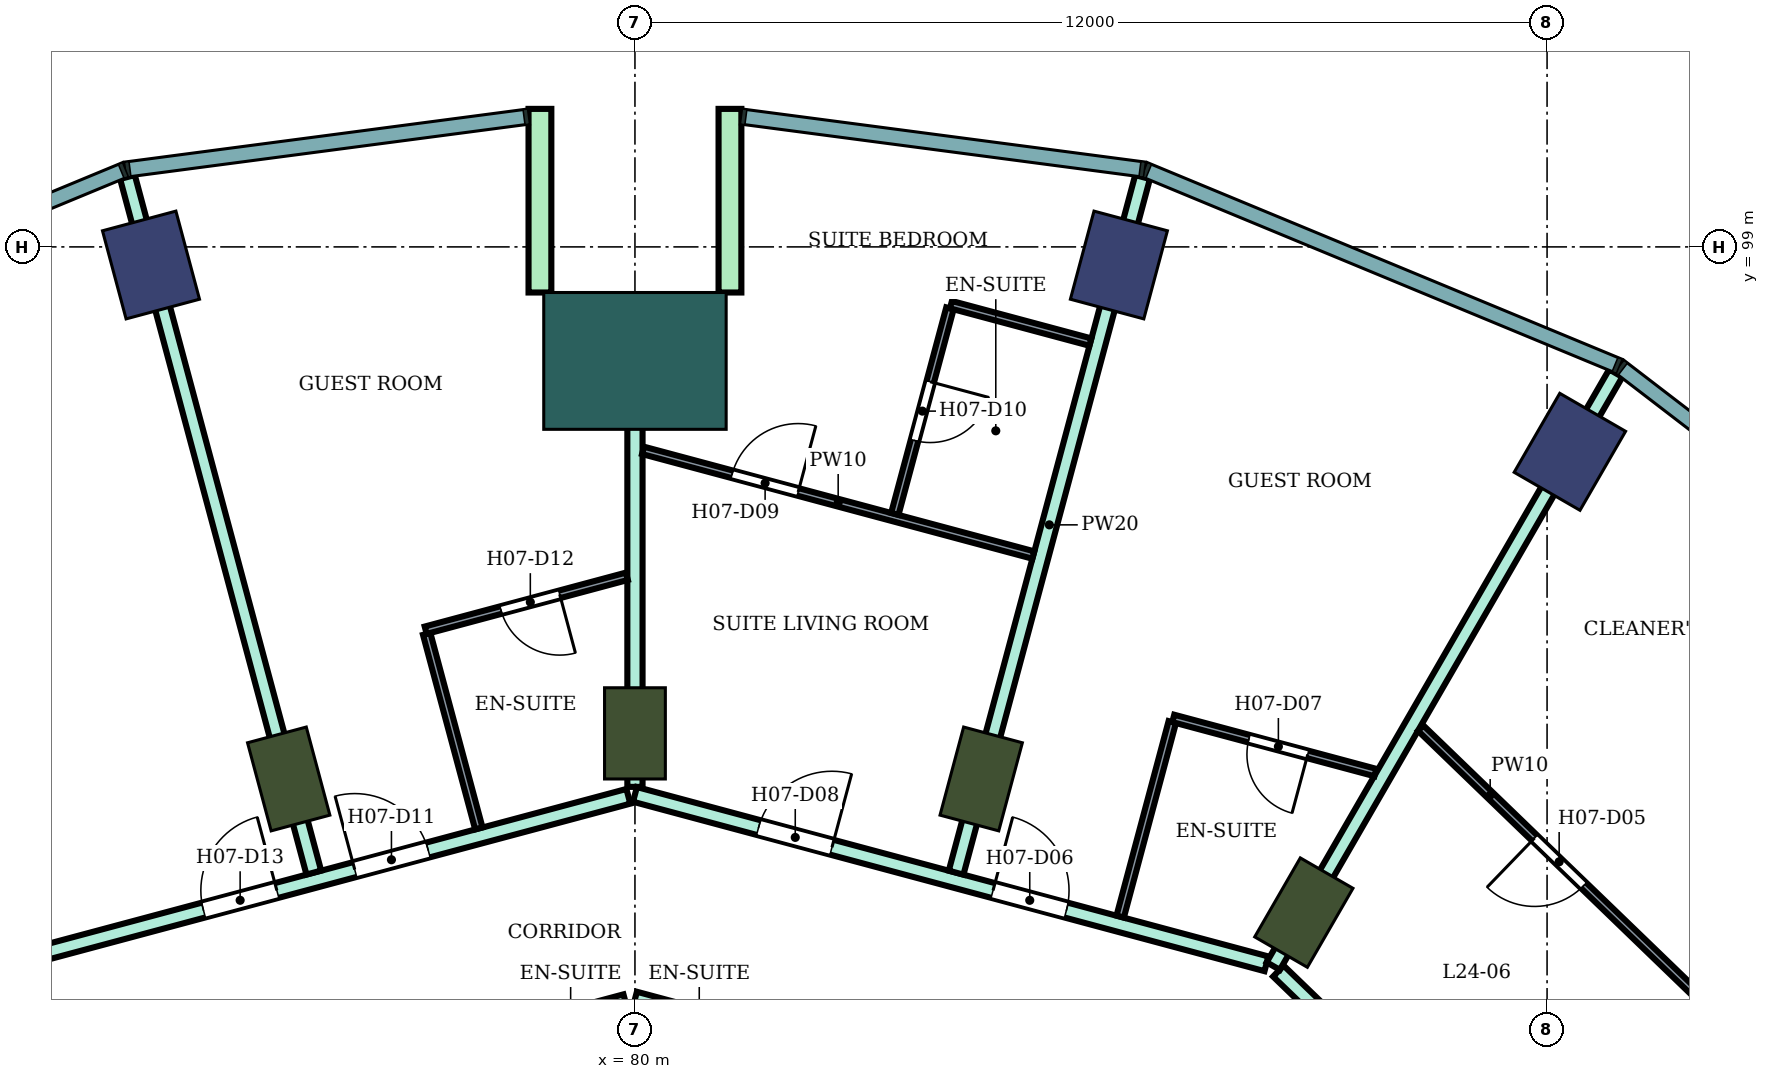
"""IFC4 building model, lengths in metres.
Left out: names, types, materials, properties, quantities, classifications, styles, units other than length and angle.
Written with IfcOpenShell. Run it as: python <this file> out.ifc"""

import sys

from ifc_helpers import new_model, si_unit, direction, frame, frame_2d, origin, origin_2d, place, context, subcontext, project, spatial, rectangle, extrude, element, fill, save


model = new_model("IFC4")
c1 = context("Model", 3, precision=1e-05, world=origin(), true_north=direction((0.0, 1.0)))
c2 = subcontext(c1, "Body", "Model", "MODEL_VIEW")
j1 = project(units=[si_unit("LENGTHUNIT", "METRE"), si_unit("PLANEANGLEUNIT", "RADIAN")], contexts=[c1])
p1 = place(None, origin())
s1 = spatial("IfcSite", under=j1, at=p1, CompositionType="ELEMENT")
p2 = place(p1, origin())
s2 = spatial("IfcBuilding", under=s1, at=p2, CompositionType="ELEMENT")
p3 = place(p2, frame((0.0, 0.0, 105.2)))
s3 = spatial("IfcBuildingStorey", under=s2, at=p3, CompositionType="ELEMENT", Elevation=105.2)
for number, where, z_axis, x_axis in (
    (1, (92.3, 96.304, 0.0), (0.0, 0.0, 1.0), (0.5, 0.866, 0.0)),
    (2, (86.367, 98.762, 0.0), (0.0, 0.0, 1.0), (0.259, 0.966, 0.0)),
    (3, (73.633, 98.762, 0.0), (0.0, 0.0, 1.0), (-0.259, 0.966, 0.0)),
):
    element("IfcColumn", number, at=place(p3, frame(where, z_axis=z_axis, x_axis=x_axis)), inside=s3, PredefinedType="COLUMN", context=c2, shape_type="SweptSolid", body=[
        extrude(rectangle(XDim=1.2, YDim=1.0, at=origin_2d()), origin(), (0.0, 0.0, 1.0), 3.8),
    ])
for number, where, z_axis, x_axis in (
    (4, (88.8, 90.242, 0.0), (0.0, 0.0, 1.0), (0.5, 0.866, 0.0)),
    (5, (84.555, 92.0, 0.0), (0.0, 0.0, 1.0), (0.259, 0.966, 0.0)),
    (6, (80.0, 92.6, 0.0), (0.0, 0.0, 1.0), (0.0, 1.0, 0.0)),
    (7, (75.445, 92.0, 0.0), (0.0, 0.0, 1.0), (-0.259, 0.966, 0.0)),
):
    element("IfcColumn", number, at=place(p3, frame(where, z_axis=z_axis, x_axis=x_axis)), inside=s3, PredefinedType="COLUMN", context=c2, shape_type="SweptSolid", body=[
        extrude(rectangle(XDim=1.2, YDim=0.8, at=origin_2d()), origin(), (0.0, 0.0, 1.0), 3.8),
    ])
p4 = place(p3, frame((80.0, 97.5, 0.0), z_axis=(0.0, 0.0, 1.0), x_axis=(0.0, 1.0, 0.0)))
e8 = element("IfcColumn", 8, at=p4, inside=s3, PredefinedType="COLUMN", context=c2, shape_type="SweptSolid", body=[
    extrude(rectangle(XDim=1.8, YDim=2.4, at=origin_2d()), origin(), (0.0, 0.0, 1.0), 3.8),
])
for number, where, z_axis, x_axis in (
    (9, (81.25, 98.4, 0.0), (0.0, 0.0, 1.0), (0.0, 1.0, 0.0)),
    (10, (78.75, 98.4, 0.0), (0.0, 0.0, 1.0), (0.0, 1.0, 0.0)),
):
    element("IfcWall", number, at=place(p3, frame(where, z_axis=z_axis, x_axis=x_axis)), inside=s3, PredefinedType="NOTDEFINED", context=c2, shape_type="SweptSolid", body=[
        extrude(rectangle(XDim=2.416, YDim=0.3, at=frame_2d((1.208, 0.0))), origin(), (0.0, 0.0, 1.0), 3.8),
    ])
p5 = place(p3, frame((71.614, 89.55, 0.0), z_axis=(0.0, 0.0, 1.0), x_axis=(0.96597505802, 0.258635239832, 0.0)))
e11 = element("IfcWall", 11, at=p5, inside=s3, PredefinedType="PARTITIONING", context=c2, shape_type="SweptSolid", body=[
    extrude(rectangle(XDim=8.592, YDim=0.2, at=frame_2d((4.296, 0.0))), origin(), (0.0, 0.0, 1.0), 3.35),
])
p6 = place(p5, frame((4.865, 0.0, 0.0)))
e12 = element("IfcOpeningElement", 12, at=p6, cuts=e11, PredefinedType="OPENING", context=c2, shape_type="SweptSolid", body=[
    extrude(rectangle(XDim=1.0, YDim=2.1, at=frame_2d((0.5, 1.05))), frame((0.0, 0.11, 0.0), z_axis=(0.0, -1.0, 0.0), x_axis=(1.0, 0.0, 0.0)), (0.0, 0.0, 1.0), 0.22),
])
p7 = place(p5, frame((2.804, 0.0, 0.0)))
e13 = element("IfcOpeningElement", 13, at=p7, cuts=e11, PredefinedType="OPENING", context=c2, shape_type="SweptSolid", body=[
    extrude(rectangle(XDim=1.0, YDim=2.1, at=frame_2d((0.5, 1.05))), frame((0.0, 0.11, 0.0), z_axis=(0.0, -1.0, 0.0), x_axis=(1.0, 0.0, 0.0)), (0.0, 0.0, 1.0), 0.22),
])
p8 = place(p3, frame((73.071, 87.247, 0.0), z_axis=(0.0, 0.0, 1.0), x_axis=(0.965931651205, 0.258797305243, 0.0)))
e14 = element("IfcWall", 14, at=p8, inside=s3, PredefinedType="PARTITIONING", context=c2, shape_type="SweptSolid", body=[
    extrude(rectangle(XDim=7.043, YDim=0.2, at=frame_2d((3.521, 0.0))), origin(), (0.0, 0.0, 1.0), 3.35),
])
p9 = place(p8, frame((0.41, 0.0, 0.0)))
e15 = element("IfcOpeningElement", 15, at=p9, cuts=e14, PredefinedType="OPENING", context=c2, shape_type="SweptSolid", body=[
    extrude(rectangle(XDim=1.0, YDim=2.1, at=frame_2d((0.5, 1.05))), frame((0.0, 0.11, 0.0), z_axis=(0.0, -1.0, 0.0), x_axis=(1.0, 0.0, 0.0)), (0.0, 0.0, 1.0), 0.22),
])
p10 = place(p3, frame((73.323, 99.919, 0.0), z_axis=(0.0, 0.0, 1.0), x_axis=(0.258818956582, -0.965925850008, 0.0)))
e16 = element("IfcWall", 16, at=p10, inside=s3, PredefinedType="PARTITIONING", context=c2, shape_type="SweptSolid", body=[
    extrude(rectangle(XDim=9.473, YDim=0.2, at=frame_2d((4.737, 0.0))), origin(), (0.0, 0.0, 1.0), 3.35),
])
p11 = place(p3, frame((80.0, 89.104, 0.0), z_axis=(0.0, 0.0, 1.0), x_axis=(0.965856548257, -0.259077455964, 0.0)))
e17 = element("IfcWall", 17, at=p11, inside=s3, PredefinedType="PARTITIONING", context=c2, shape_type="SweptSolid", body=[
    extrude(rectangle(XDim=7.173, YDim=0.2, at=frame_2d((3.586, 0.0))), origin(), (0.0, 0.0, 1.0), 3.35),
])
p12 = place(p11, frame((5.763, 0.0, 0.0)))
e18 = element("IfcOpeningElement", 18, at=p12, cuts=e17, PredefinedType="OPENING", context=c2, shape_type="SweptSolid", body=[
    extrude(rectangle(XDim=1.0, YDim=2.1, at=frame_2d((0.5, 1.05))), frame((0.0, 0.11, 0.0), z_axis=(0.0, -1.0, 0.0), x_axis=(1.0, 0.0, 0.0)), (0.0, 0.0, 1.0), 0.22),
])
p13 = place(p3, frame((80.0, 91.896, 0.0), z_axis=(0.0, 0.0, 1.0), x_axis=(0.0, 1.0, 0.0)))
e19 = element("IfcWall", 19, at=p13, inside=s3, PredefinedType="PARTITIONING", context=c2, shape_type="SweptSolid", body=[
    extrude(rectangle(XDim=6.304, YDim=0.2, at=frame_2d((3.152, 0.0))), origin(), (0.0, 0.0, 1.0), 3.35),
])
p14 = place(p3, frame((80.0, 91.797, 0.0), z_axis=(0.0, 0.0, 1.0), x_axis=(0.965857042792, -0.259075612301, 0.0)))
e20 = element("IfcWall", 20, at=p14, inside=s3, PredefinedType="PARTITIONING", context=c2, shape_type="SweptSolid", body=[
    extrude(rectangle(XDim=8.602, YDim=0.2, at=frame_2d((4.301, 0.0))), origin(), (0.0, 0.0, 1.0), 3.35),
])
p15 = place(p14, frame((4.877, 0.0, 0.0)))
e21 = element("IfcOpeningElement", 21, at=p15, cuts=e20, PredefinedType="OPENING", context=c2, shape_type="SweptSolid", body=[
    extrude(rectangle(XDim=1.0, YDim=2.1, at=frame_2d((0.5, 1.05))), frame((0.0, 0.11, 0.0), z_axis=(0.0, -1.0, 0.0), x_axis=(1.0, 0.0, 0.0)), (0.0, 0.0, 1.0), 0.22),
])
p16 = place(p14, frame((1.683, 0.0, 0.0)))
e22 = element("IfcOpeningElement", 22, at=p16, cuts=e20, PredefinedType="OPENING", context=c2, shape_type="SweptSolid", body=[
    extrude(rectangle(XDim=1.0, YDim=2.1, at=frame_2d((0.5, 1.05))), frame((0.0, 0.11, 0.0), z_axis=(0.0, -1.0, 0.0), x_axis=(1.0, 0.0, 0.0)), (0.0, 0.0, 1.0), 0.22),
])
p17 = place(p3, frame((84.225, 90.768, 0.0), z_axis=(0.0, 0.0, 1.0), x_axis=(0.258895798654, 0.965905256968, 0.0)))
e23 = element("IfcWall", 23, at=p17, inside=s3, PredefinedType="PARTITIONING", context=c2, shape_type="SweptSolid", body=[
    extrude(rectangle(XDim=9.474, YDim=0.2, at=frame_2d((4.737, 0.0))), origin(), (0.0, 0.0, 1.0), 3.35),
])
p18 = place(p3, frame((88.465, 89.473, 0.0), z_axis=(0.0, 0.0, 1.0), x_axis=(0.719531044682, -0.694460276574, 0.0)))
e24 = element("IfcWall", 24, at=p18, inside=s3, PredefinedType="PARTITIONING", context=c2, shape_type="SweptSolid", body=[
    extrude(rectangle(XDim=6.524, YDim=0.2, at=frame_2d((3.262, 0.0))), origin(), (0.0, 0.0, 1.0), 3.35),
])
p19 = place(p18, frame((1.629, 0.0, 0.0)))
e25 = element("IfcOpeningElement", 25, at=p19, cuts=e24, PredefinedType="OPENING", context=c2, shape_type="SweptSolid", body=[
    extrude(rectangle(XDim=0.9, YDim=2.1, at=frame_2d((0.45, 1.05))), frame((0.0, 0.11, 0.0), z_axis=(0.0, -1.0, 0.0), x_axis=(1.0, 0.0, 0.0)), (0.0, 0.0, 1.0), 0.22),
])
p20 = place(p3, frame((88.398, 89.539, 0.0), z_axis=(0.0, 0.0, 1.0), x_axis=(0.50025185873, 0.86587994424, 0.0)))
e26 = element("IfcWall", 26, at=p20, inside=s3, PredefinedType="PARTITIONING", context=c2, shape_type="SweptSolid", body=[
    extrude(rectangle(XDim=9.008, YDim=0.2, at=frame_2d((4.504, 0.0))), origin(), (0.0, 0.0, 1.0), 3.35),
])
p21 = place(p3, frame((91.595, 86.59, 0.0), z_axis=(0.0, 0.0, 1.0), x_axis=(0.707268206752, 0.706945318761, 0.0)))
e27 = element("IfcWall", 27, at=p21, inside=s3, PredefinedType="PARTITIONING", context=c2, shape_type="SweptSolid", body=[
    extrude(rectangle(XDim=6.805, YDim=0.2, at=frame_2d((3.402, 0.0))), origin(), (0.0, 0.0, 1.0), 3.35),
])
p22 = place(p3, frame((77.26, 93.909, 0.0), z_axis=(0.0, 0.0, 1.0), x_axis=(0.258935674139, -0.965894568086, 0.0)))
e28 = element("IfcWall", 28, at=p22, inside=s3, PredefinedType="PARTITIONING", context=c2, shape_type="SweptSolid", body=[
    extrude(rectangle(XDim=2.649, YDim=0.1, at=frame_2d((1.325, 0.0))), origin(), (0.0, 0.0, 1.0), 3.35),
])
p23 = place(p3, frame((77.247, 93.957, 0.0), z_axis=(0.0, 0.0, 1.0), x_axis=(0.965899920864, 0.258915706119, 0.0)))
e29 = element("IfcWall", 29, at=p23, inside=s3, PredefinedType="PARTITIONING", context=c2, shape_type="SweptSolid", body=[
    extrude(rectangle(XDim=2.74, YDim=0.1, at=frame_2d((1.37, 0.0))), origin(), (0.0, 0.0, 1.0), 3.35),
])
p24 = place(p23, frame((1.025, 0.0, 0.0)))
e30 = element("IfcOpeningElement", 30, at=p24, cuts=e29, PredefinedType="OPENING", context=c2, shape_type="SweptSolid", body=[
    extrude(rectangle(XDim=0.8, YDim=2.1, at=frame_2d((0.4, 1.05))), frame((0.0, 0.06, 0.0), z_axis=(0.0, -1.0, 0.0), x_axis=(1.0, 0.0, 0.0)), (0.0, 0.0, 1.0), 0.12),
])
p25 = place(p3, frame((80.106, 96.323, 0.0), z_axis=(0.0, 0.0, 1.0), x_axis=(0.965885715826, -0.258968693017, 0.0)))
e31 = element("IfcWall", 31, at=p25, inside=s3, PredefinedType="PARTITIONING", context=c2, shape_type="SweptSolid", body=[
    extrude(rectangle(XDim=5.316, YDim=0.1, at=frame_2d((2.658, 0.0))), origin(), (0.0, 0.0, 1.0), 3.35),
])
p26 = place(p25, frame((1.213, 0.0, 0.0)))
e32 = element("IfcOpeningElement", 32, at=p26, cuts=e31, PredefinedType="OPENING", context=c2, shape_type="SweptSolid", body=[
    extrude(rectangle(XDim=0.9, YDim=2.1, at=frame_2d((0.45, 1.05))), frame((0.0, 0.06, 0.0), z_axis=(0.0, -1.0, 0.0), x_axis=(1.0, 0.0, 0.0)), (0.0, 0.0, 1.0), 0.12),
])
p27 = place(p3, frame((83.419, 95.487, 0.0), z_axis=(0.0, 0.0, 1.0), x_axis=(0.258975798317, 0.965883810759, 0.0)))
e33 = element("IfcWall", 33, at=p27, inside=s3, PredefinedType="PARTITIONING", context=c2, shape_type="SweptSolid", body=[
    extrude(rectangle(XDim=2.8, YDim=0.1, at=frame_2d((1.4, 0.0))), origin(), (0.0, 0.0, 1.0), 3.35),
])
p28 = place(p27, frame((1.0, 0.0, 0.0)))
e34 = element("IfcOpeningElement", 34, at=p28, cuts=e33, PredefinedType="OPENING", context=c2, shape_type="SweptSolid", body=[
    extrude(rectangle(XDim=0.8, YDim=2.1, at=frame_2d((0.4, 1.05))), frame((0.0, 0.06, 0.0), z_axis=(0.0, -1.0, 0.0), x_axis=(1.0, 0.0, 0.0)), (0.0, 0.0, 1.0), 0.12),
])
p29 = place(p3, frame((84.157, 98.24, 0.0), z_axis=(0.0, 0.0, 1.0), x_axis=(0.96584126793, -0.259134415244, 0.0)))
e35 = element("IfcWall", 35, at=p29, inside=s3, PredefinedType="PARTITIONING", context=c2, shape_type="SweptSolid", body=[
    extrude(rectangle(XDim=1.899, YDim=0.1, at=frame_2d((0.95, 0.0))), origin(), (0.0, 0.0, 1.0), 3.35),
])
p30 = place(p3, frame((86.384, 90.19, 0.0), z_axis=(0.0, 0.0, 1.0), x_axis=(0.258677737588, 0.965963678446, 0.0)))
e36 = element("IfcWall", 36, at=p30, inside=s3, PredefinedType="PARTITIONING", context=c2, shape_type="SweptSolid", body=[
    extrude(rectangle(XDim=2.649, YDim=0.1, at=frame_2d((1.325, 0.0))), origin(), (0.0, 0.0, 1.0), 3.35),
])
p31 = place(p3, frame((87.082, 92.797, 0.0), z_axis=(0.0, 0.0, 1.0), x_axis=(0.965942906494, -0.258755292495, 0.0)))
e37 = element("IfcWall", 37, at=p31, inside=s3, PredefinedType="PARTITIONING", context=c2, shape_type="SweptSolid", body=[
    extrude(rectangle(XDim=2.753, YDim=0.1, at=frame_2d((1.376, 0.0))), origin(), (0.0, 0.0, 1.0), 3.35),
])
p32 = place(p31, frame((1.032, 0.0, 0.0)))
e38 = element("IfcOpeningElement", 38, at=p32, cuts=e37, PredefinedType="OPENING", context=c2, shape_type="SweptSolid", body=[
    extrude(rectangle(XDim=0.8, YDim=2.1, at=frame_2d((0.4, 1.05))), frame((0.0, 0.06, 0.0), z_axis=(0.0, -1.0, 0.0), x_axis=(1.0, 0.0, 0.0)), (0.0, 0.0, 1.0), 0.12),
])
p33 = place(p3, frame((90.337, 92.669, 0.0), z_axis=(0.0, 0.0, 1.0), x_axis=(0.71952469278, -0.694466857726, 0.0)))
e39 = element("IfcWall", 39, at=p33, inside=s3, PredefinedType="PARTITIONING", context=c2, shape_type="SweptSolid", body=[
    extrude(rectangle(XDim=5.086, YDim=0.1, at=frame_2d((2.543, 0.0))), origin(), (0.0, 0.0, 1.0), 3.35),
])
p34 = place(p33, frame((2.083, 0.0, 0.0)))
e40 = element("IfcOpeningElement", 40, at=p34, cuts=e39, PredefinedType="OPENING", context=c2, shape_type="SweptSolid", body=[
    extrude(rectangle(XDim=0.9, YDim=2.1, at=frame_2d((0.45, 1.05))), frame((0.0, 0.06, 0.0), z_axis=(0.0, -1.0, 0.0), x_axis=(1.0, 0.0, 0.0)), (0.0, 0.0, 1.0), 0.12),
])
p35 = place(p34, frame((0.9, 0.0, 0.0), z_axis=(0.0, 0.0, 1.0), x_axis=(-1.0, 0.0, 0.0)))
e41 = element("IfcDoor", 41, at=p35, inside=s3, OperationType="SINGLE_SWING_RIGHT", PredefinedType="DOOR", context=c2, shape_type="SweptSolid", body=[
    extrude(rectangle(XDim=0.9, YDim=2.1, at=frame_2d((0.45, 1.05))), frame((0.0, 0.025, 0.0), z_axis=(0.0, -1.0, 0.0), x_axis=(1.0, 0.0, 0.0)), (0.0, 0.0, 1.0), 0.05),
])
fill(e40, e41)
p36 = place(p15, origin())
e42 = element("IfcDoor", 42, at=p36, inside=s3, OperationType="SINGLE_SWING_LEFT", PredefinedType="DOOR", context=c2, shape_type="SweptSolid", body=[
    extrude(rectangle(XDim=1.0, YDim=2.1, at=frame_2d((0.5, 1.05))), frame((0.0, 0.025, 0.0), z_axis=(0.0, -1.0, 0.0), x_axis=(1.0, 0.0, 0.0)), (0.0, 0.0, 1.0), 0.05),
])
fill(e21, e42)
p37 = place(p32, frame((0.8, 0.0, 0.0), z_axis=(0.0, 0.0, 1.0), x_axis=(-1.0, 0.0, 0.0)))
e43 = element("IfcDoor", 43, at=p37, inside=s3, OperationType="SINGLE_SWING_LEFT", PredefinedType="DOOR", context=c2, shape_type="SweptSolid", body=[
    extrude(rectangle(XDim=0.8, YDim=2.1, at=frame_2d((0.4, 1.05))), frame((0.0, 0.025, 0.0), z_axis=(0.0, -1.0, 0.0), x_axis=(1.0, 0.0, 0.0)), (0.0, 0.0, 1.0), 0.05),
])
fill(e38, e43)
p38 = place(p16, origin())
e44 = element("IfcDoor", 44, at=p38, inside=s3, OperationType="SINGLE_SWING_RIGHT", PredefinedType="DOOR", context=c2, shape_type="SweptSolid", body=[
    extrude(rectangle(XDim=1.0, YDim=2.1, at=frame_2d((0.5, 1.05))), frame((0.0, 0.025, 0.0), z_axis=(0.0, -1.0, 0.0), x_axis=(1.0, 0.0, 0.0)), (0.0, 0.0, 1.0), 0.05),
])
fill(e22, e44)
p39 = place(p26, origin())
e45 = element("IfcDoor", 45, at=p39, inside=s3, OperationType="SINGLE_SWING_RIGHT", PredefinedType="DOOR", context=c2, shape_type="SweptSolid", body=[
    extrude(rectangle(XDim=0.9, YDim=2.1, at=frame_2d((0.45, 1.05))), frame((0.0, 0.025, 0.0), z_axis=(0.0, -1.0, 0.0), x_axis=(1.0, 0.0, 0.0)), (0.0, 0.0, 1.0), 0.05),
])
fill(e32, e45)
p40 = place(p28, frame((0.8, 0.0, 0.0), z_axis=(0.0, 0.0, 1.0), x_axis=(-1.0, 0.0, 0.0)))
e46 = element("IfcDoor", 46, at=p40, inside=s3, OperationType="SINGLE_SWING_LEFT", PredefinedType="DOOR", context=c2, shape_type="SweptSolid", body=[
    extrude(rectangle(XDim=0.8, YDim=2.1, at=frame_2d((0.4, 1.05))), frame((0.0, 0.025, 0.0), z_axis=(0.0, -1.0, 0.0), x_axis=(1.0, 0.0, 0.0)), (0.0, 0.0, 1.0), 0.05),
])
fill(e34, e46)
p41 = place(p6, origin())
e47 = element("IfcDoor", 47, at=p41, inside=s3, OperationType="SINGLE_SWING_LEFT", PredefinedType="DOOR", context=c2, shape_type="SweptSolid", body=[
    extrude(rectangle(XDim=1.0, YDim=2.1, at=frame_2d((0.5, 1.05))), frame((0.0, 0.025, 0.0), z_axis=(0.0, -1.0, 0.0), x_axis=(1.0, 0.0, 0.0)), (0.0, 0.0, 1.0), 0.05),
])
fill(e12, e47)
p42 = place(p24, frame((0.8, 0.0, 0.0), z_axis=(0.0, 0.0, 1.0), x_axis=(-1.0, 0.0, 0.0)))
e48 = element("IfcDoor", 48, at=p42, inside=s3, OperationType="SINGLE_SWING_LEFT", PredefinedType="DOOR", context=c2, shape_type="SweptSolid", body=[
    extrude(rectangle(XDim=0.8, YDim=2.1, at=frame_2d((0.4, 1.05))), frame((0.0, 0.025, 0.0), z_axis=(0.0, -1.0, 0.0), x_axis=(1.0, 0.0, 0.0)), (0.0, 0.0, 1.0), 0.05),
])
fill(e30, e48)
p43 = place(p7, origin())
e49 = element("IfcDoor", 49, at=p43, inside=s3, OperationType="SINGLE_SWING_RIGHT", PredefinedType="DOOR", context=c2, shape_type="SweptSolid", body=[
    extrude(rectangle(XDim=1.0, YDim=2.1, at=frame_2d((0.5, 1.05))), frame((0.0, 0.025, 0.0), z_axis=(0.0, -1.0, 0.0), x_axis=(1.0, 0.0, 0.0)), (0.0, 0.0, 1.0), 0.05),
])
fill(e13, e49)
save(model, sys.argv[1])
